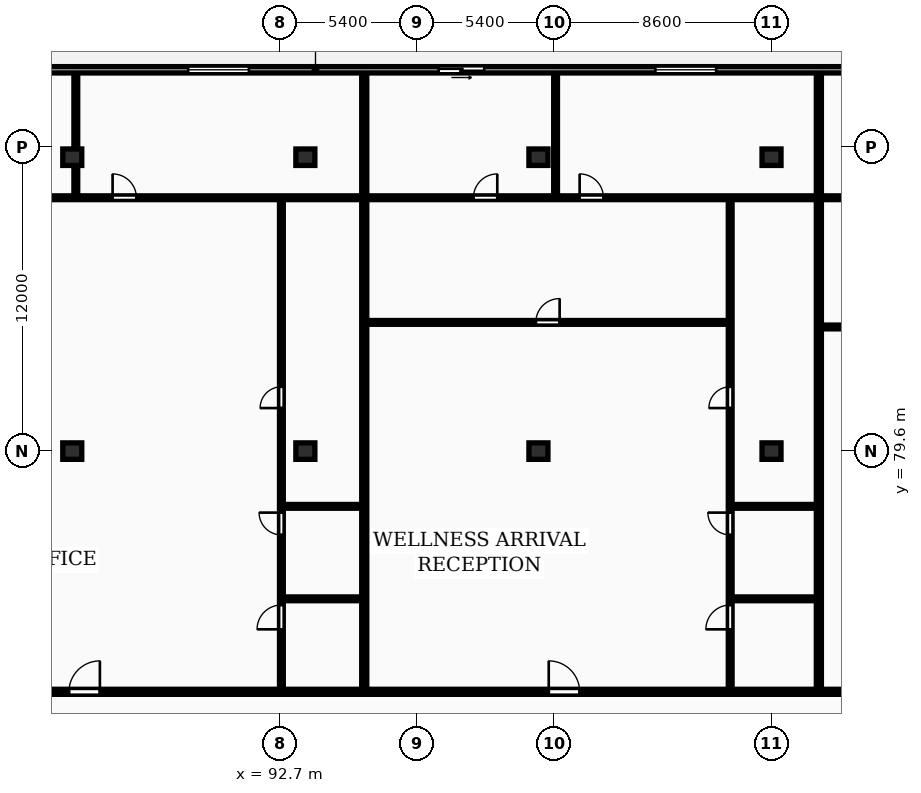
"""IFC4 building model, lengths in metres.
Left out: names, types, materials, properties, quantities, classifications, styles, units other than length and angle.
Written with IfcOpenShell. Run it as: python <this file> out.ifc"""

import sys

from ifc_helpers import new_model, si_unit, direction, frame, frame_2d, origin, origin_2d, place, context, subcontext, project, spatial, rectangle, extrude, element, fill, save


model = new_model("IFC4")
c1 = context("Model", 3, precision=1e-05, world=origin(), true_north=direction((0.0, 1.0)))
c2 = subcontext(c1, "Body", "Model", "MODEL_VIEW")
j1 = project(units=[si_unit("LENGTHUNIT", "METRE"), si_unit("PLANEANGLEUNIT", "RADIAN")], contexts=[c1])
p1 = place(None, origin())
s1 = spatial("IfcSite", under=j1, at=p1, CompositionType="ELEMENT")
p2 = place(p1, origin())
s2 = spatial("IfcBuilding", under=s1, at=p2, CompositionType="ELEMENT")
p3 = place(p2, frame((0.0, 0.0, 242.45)))
s3 = spatial("IfcBuildingStorey", under=s2, at=p3, CompositionType="ELEMENT", Elevation=242.45)
for number, where, z_axis, x_axis in (
    (1, (84.5, 79.6, 0.0), (0.0, 0.0, 1.0), (1.0, 0.0, 0.0)),
    (2, (84.5, 91.2, 0.0), (0.0, 0.0, 1.0), (1.0, 0.0, 0.0)),
    (3, (93.7, 79.6, 0.0), (0.0, 0.0, 1.0), (1.0, 0.0, 0.0)),
    (4, (93.7, 91.2, 0.0), (0.0, 0.0, 1.0), (1.0, 0.0, 0.0)),
    (5, (102.9, 79.6, 0.0), (0.0, 0.0, 1.0), (1.0, 0.0, 0.0)),
    (6, (102.9, 91.2, 0.0), (0.0, 0.0, 1.0), (1.0, 0.0, 0.0)),
    (7, (112.1, 79.6, 0.0), (0.0, 0.0, 1.0), (1.0, 0.0, 0.0)),
    (8, (112.1, 91.2, 0.0), (0.0, 0.0, 1.0), (1.0, 0.0, 0.0)),
):
    element("IfcColumn", number, at=place(p3, frame(where, z_axis=z_axis, x_axis=x_axis)), inside=s3, PredefinedType="COLUMN", context=c2, shape_type="SweptSolid", body=[
        extrude(rectangle(XDim=0.75, YDim=0.65, at=origin_2d()), origin(), (0.0, 0.0, 1.0), 3.45),
    ])
p4 = place(p3, frame((128.4, 94.65, 0.0), z_axis=(0.0, 0.0, 1.0), x_axis=(-1.0, 0.0, 0.0)))
e9 = element("IfcWall", 9, at=p4, inside=s3, PredefinedType="STANDARD", context=c2, shape_type="SweptSolid", body=[
    extrude(rectangle(XDim=68.6, YDim=0.25, at=frame_2d((34.3, 0.0))), origin(), (0.0, 0.0, 1.0), 3.17),
])
p5 = place(p4, frame((59.137, 0.0, 0.85)))
e10 = element("IfcOpeningElement", 10, at=p5, cuts=e9, PredefinedType="OPENING", context=c2, shape_type="SweptSolid", body=[
    extrude(rectangle(XDim=2.4, YDim=1.9, at=frame_2d((1.2, 0.95))), frame((0.0, 0.135, 0.0), z_axis=(0.0, -1.0, 0.0), x_axis=(1.0, 0.0, 0.0)), (0.0, 0.0, 1.0), 0.27),
])
p6 = place(p4, frame((65.245, 0.0, 0.0)))
e11 = element("IfcOpeningElement", 11, at=p6, cuts=e9, PredefinedType="OPENING", context=c2, shape_type="SweptSolid", body=[
    extrude(rectangle(XDim=1.8, YDim=2.2, at=frame_2d((0.9, 1.1))), frame((0.0, 0.135, 0.0), z_axis=(0.0, -1.0, 0.0), x_axis=(1.0, 0.0, 0.0)), (0.0, 0.0, 1.0), 0.27),
])
p7 = place(p4, frame((53.56, 0.0, 0.85)))
e12 = element("IfcOpeningElement", 12, at=p7, cuts=e9, PredefinedType="OPENING", context=c2, shape_type="SweptSolid", body=[
    extrude(rectangle(XDim=2.4, YDim=1.9, at=frame_2d((1.2, 0.95))), frame((0.0, 0.135, 0.0), z_axis=(0.0, -1.0, 0.0), x_axis=(1.0, 0.0, 0.0)), (0.0, 0.0, 1.0), 0.27),
])
p8 = place(p4, frame((47.188, 0.0, 0.0)))
e13 = element("IfcOpeningElement", 13, at=p8, cuts=e9, PredefinedType="OPENING", context=c2, shape_type="SweptSolid", body=[
    extrude(rectangle(XDim=1.8, YDim=2.2, at=frame_2d((0.9, 1.1))), frame((0.0, 0.135, 0.0), z_axis=(0.0, -1.0, 0.0), x_axis=(1.0, 0.0, 0.0)), (0.0, 0.0, 1.0), 0.27),
])
p9 = place(p4, frame((36.928, 0.0, 0.85)))
e14 = element("IfcOpeningElement", 14, at=p9, cuts=e9, PredefinedType="OPENING", context=c2, shape_type="SweptSolid", body=[
    extrude(rectangle(XDim=2.4, YDim=1.9, at=frame_2d((1.2, 0.95))), frame((0.0, 0.135, 0.0), z_axis=(0.0, -1.0, 0.0), x_axis=(1.0, 0.0, 0.0)), (0.0, 0.0, 1.0), 0.27),
])
p10 = place(p4, frame((27.64, 0.0, 0.0)))
e15 = element("IfcOpeningElement", 15, at=p10, cuts=e9, PredefinedType="OPENING", context=c2, shape_type="SweptSolid", body=[
    extrude(rectangle(XDim=1.8, YDim=2.2, at=frame_2d((0.9, 1.1))), frame((0.0, 0.135, 0.0), z_axis=(0.0, -1.0, 0.0), x_axis=(1.0, 0.0, 0.0)), (0.0, 0.0, 1.0), 0.27),
])
p11 = place(p4, frame((18.487, 0.0, 0.85)))
e16 = element("IfcOpeningElement", 16, at=p11, cuts=e9, PredefinedType="OPENING", context=c2, shape_type="SweptSolid", body=[
    extrude(rectangle(XDim=2.4, YDim=1.9, at=frame_2d((1.2, 0.95))), frame((0.0, 0.135, 0.0), z_axis=(0.0, -1.0, 0.0), x_axis=(1.0, 0.0, 0.0)), (0.0, 0.0, 1.0), 0.27),
])
p12 = place(p4, frame((7.966, 0.0, 0.0)))
e17 = element("IfcOpeningElement", 17, at=p12, cuts=e9, PredefinedType="OPENING", context=c2, shape_type="SweptSolid", body=[
    extrude(rectangle(XDim=1.8, YDim=2.2, at=frame_2d((0.9, 1.1))), frame((0.0, 0.135, 0.0), z_axis=(0.0, -1.0, 0.0), x_axis=(1.0, 0.0, 0.0)), (0.0, 0.0, 1.0), 0.27),
])
p13 = place(p4, frame((0.87, 0.0, 0.85)))
e18 = element("IfcOpeningElement", 18, at=p13, cuts=e9, PredefinedType="OPENING", context=c2, shape_type="SweptSolid", body=[
    extrude(rectangle(XDim=1.8, YDim=1.8, at=frame_2d((0.9, 0.9))), frame((0.0, 0.135, 0.0), z_axis=(0.0, -1.0, 0.0), x_axis=(1.0, 0.0, 0.0)), (0.0, 0.0, 1.0), 0.27),
])
p14 = place(p3, frame((96.024, 70.18, 0.0), z_axis=(0.0, 0.0, 1.0), x_axis=(0.0, 1.0, 0.0)))
e19 = element("IfcWall", 19, at=p14, inside=s3, PredefinedType="PARTITIONING", context=c2, shape_type="SweptSolid", body=[
    extrude(rectangle(XDim=24.32, YDim=0.2, at=frame_2d((12.16, 0.0))), origin(), (0.0, 0.0, 1.0), 3.17),
])
for number, where, z_axis, x_axis in (
    (20, (92.814, 73.77, 0.0), (0.0, 0.0, 1.0), (1.0, 0.0, 0.0)),
    (21, (92.814, 77.42, 0.0), (0.0, 0.0, 1.0), (1.0, 0.0, 0.0)),
):
    element("IfcWall", number, at=place(p3, frame(where, z_axis=z_axis, x_axis=x_axis)), inside=s3, PredefinedType="PARTITIONING", context=c2, shape_type="SweptSolid", body=[
        extrude(rectangle(XDim=3.13, YDim=0.15, at=frame_2d((1.565, 0.0))), origin(), (0.0, 0.0, 1.0), 3.17),
    ])
p15 = place(p3, frame((92.754, 70.16, 0.0), z_axis=(0.0, 0.0, 1.0), x_axis=(0.0, 1.0, 0.0)))
e22 = element("IfcWall", 22, at=p15, inside=s3, PredefinedType="PARTITIONING", context=c2, shape_type="SweptSolid", body=[
    extrude(rectangle(XDim=19.38, YDim=0.15, at=frame_2d((9.69, 0.0))), origin(), (0.0, 0.0, 1.0), 3.17),
])
p16 = place(p15, frame((2.406, 0.0, 0.0)))
e23 = element("IfcOpeningElement", 23, at=p16, cuts=e22, PredefinedType="OPENING", context=c2, shape_type="SweptSolid", body=[
    extrude(rectangle(XDim=0.96, YDim=2.1, at=frame_2d((0.48, 1.05))), frame((0.0, 0.085, 0.0), z_axis=(0.0, -1.0, 0.0), x_axis=(1.0, 0.0, 0.0)), (0.0, 0.0, 1.0), 0.17),
])
p17 = place(p15, frame((6.133, 0.0, 0.0)))
e24 = element("IfcOpeningElement", 24, at=p17, cuts=e22, PredefinedType="OPENING", context=c2, shape_type="SweptSolid", body=[
    extrude(rectangle(XDim=0.88, YDim=2.06, at=frame_2d((0.44, 1.03))), frame((0.0, 0.085, 0.0), z_axis=(0.0, -1.0, 0.0), x_axis=(1.0, 0.0, 0.0)), (0.0, 0.0, 1.0), 0.17),
])
p18 = place(p15, frame((11.139, 0.0, 0.0)))
e25 = element("IfcOpeningElement", 25, at=p18, cuts=e22, PredefinedType="OPENING", context=c2, shape_type="SweptSolid", body=[
    extrude(rectangle(XDim=0.84, YDim=2.04, at=frame_2d((0.42, 1.02))), frame((0.0, 0.085, 0.0), z_axis=(0.0, -1.0, 0.0), x_axis=(1.0, 0.0, 0.0)), (0.0, 0.0, 1.0), 0.17),
])
p19 = place(p3, frame((84.64, 89.68, 0.0), z_axis=(0.0, 0.0, 1.0), x_axis=(0.0, 1.0, 0.0)))
e26 = element("IfcWall", 26, at=p19, inside=s3, PredefinedType="PARTITIONING", context=c2, shape_type="SweptSolid", body=[
    extrude(rectangle(XDim=4.82, YDim=0.15, at=frame_2d((2.41, 0.0))), origin(), (0.0, 0.0, 1.0), 2.477),
])
p20 = place(p3, frame((75.945, 89.6, 0.0), z_axis=(0.0, 0.0, 1.0), x_axis=(1.0, 0.0, 0.0)))
e27 = element("IfcWall", 27, at=p20, inside=s3, PredefinedType="PARTITIONING", context=c2, shape_type="SweptSolid", body=[
    extrude(rectangle(XDim=19.999, YDim=0.15, at=frame_2d((10.0, 0.0))), origin(), (0.0, 0.0, 1.0), 3.17),
])
p21 = place(p20, frame((6.054, 0.0, 0.0)))
e28 = element("IfcOpeningElement", 28, at=p21, cuts=e27, PredefinedType="OPENING", context=c2, shape_type="SweptSolid", body=[
    extrude(rectangle(XDim=0.94, YDim=2.1, at=frame_2d((0.47, 1.05))), frame((0.0, 0.085, 0.0), z_axis=(0.0, -1.0, 0.0), x_axis=(1.0, 0.0, 0.0)), (0.0, 0.0, 1.0), 0.17),
])
p22 = place(p20, frame((10.146, 0.0, 0.0)))
e29 = element("IfcOpeningElement", 29, at=p22, cuts=e27, PredefinedType="OPENING", context=c2, shape_type="SweptSolid", body=[
    extrude(rectangle(XDim=0.94, YDim=2.1, at=frame_2d((0.47, 1.05))), frame((0.0, 0.085, 0.0), z_axis=(0.0, -1.0, 0.0), x_axis=(1.0, 0.0, 0.0)), (0.0, 0.0, 1.0), 0.17),
])
p23 = place(p3, frame((113.969, 70.18, 0.0), z_axis=(0.0, 0.0, 1.0), x_axis=(0.0, 1.0, 0.0)))
e30 = element("IfcWall", 30, at=p23, inside=s3, PredefinedType="PARTITIONING", context=c2, shape_type="SweptSolid", body=[
    extrude(rectangle(XDim=24.32, YDim=0.2, at=frame_2d((12.16, 0.0))), origin(), (0.0, 0.0, 1.0), 3.17),
])
p24 = place(p3, frame((96.104, 84.68, 0.0), z_axis=(0.0, 0.0, 1.0), x_axis=(1.0, 0.0, 0.0)))
e31 = element("IfcWall", 31, at=p24, inside=s3, PredefinedType="PARTITIONING", context=c2, shape_type="SweptSolid", body=[
    extrude(rectangle(XDim=14.324, YDim=0.15, at=frame_2d((7.162, 0.0))), origin(), (0.0, 0.0, 1.0), 3.17),
])
p25 = place(p24, frame((6.692, 0.0, 0.0)))
e32 = element("IfcOpeningElement", 32, at=p25, cuts=e31, PredefinedType="OPENING", context=c2, shape_type="SweptSolid", body=[
    extrude(rectangle(XDim=0.94, YDim=2.1, at=frame_2d((0.47, 1.05))), frame((0.0, 0.085, 0.0), z_axis=(0.0, -1.0, 0.0), x_axis=(1.0, 0.0, 0.0)), (0.0, 0.0, 1.0), 0.17),
])
for number, where, z_axis, x_axis in (
    (33, (110.529, 73.77, 0.0), (0.0, 0.0, 1.0), (1.0, 0.0, 0.0)),
    (34, (110.529, 77.42, 0.0), (0.0, 0.0, 1.0), (1.0, 0.0, 0.0)),
):
    element("IfcWall", number, at=place(p3, frame(where, z_axis=z_axis, x_axis=x_axis)), inside=s3, PredefinedType="PARTITIONING", context=c2, shape_type="SweptSolid", body=[
        extrude(rectangle(XDim=3.36, YDim=0.15, at=frame_2d((1.68, 0.0))), origin(), (0.0, 0.0, 1.0), 3.17),
    ])
p26 = place(p3, frame((110.469, 70.16, 0.0), z_axis=(0.0, 0.0, 1.0), x_axis=(0.0, 1.0, 0.0)))
e35 = element("IfcWall", 35, at=p26, inside=s3, PredefinedType="PARTITIONING", context=c2, shape_type="SweptSolid", body=[
    extrude(rectangle(XDim=19.38, YDim=0.15, at=frame_2d((9.69, 0.0))), origin(), (0.0, 0.0, 1.0), 3.17),
])
p27 = place(p26, frame((2.406, 0.0, 0.0)))
e36 = element("IfcOpeningElement", 36, at=p27, cuts=e35, PredefinedType="OPENING", context=c2, shape_type="SweptSolid", body=[
    extrude(rectangle(XDim=0.96, YDim=2.1, at=frame_2d((0.48, 1.05))), frame((0.0, 0.085, 0.0), z_axis=(0.0, -1.0, 0.0), x_axis=(1.0, 0.0, 0.0)), (0.0, 0.0, 1.0), 0.17),
])
p28 = place(p26, frame((6.133, 0.0, 0.0)))
e37 = element("IfcOpeningElement", 37, at=p28, cuts=e35, PredefinedType="OPENING", context=c2, shape_type="SweptSolid", body=[
    extrude(rectangle(XDim=0.88, YDim=2.06, at=frame_2d((0.44, 1.03))), frame((0.0, 0.085, 0.0), z_axis=(0.0, -1.0, 0.0), x_axis=(1.0, 0.0, 0.0)), (0.0, 0.0, 1.0), 0.17),
])
p29 = place(p26, frame((11.139, 0.0, 0.0)))
e38 = element("IfcOpeningElement", 38, at=p29, cuts=e35, PredefinedType="OPENING", context=c2, shape_type="SweptSolid", body=[
    extrude(rectangle(XDim=0.84, YDim=2.04, at=frame_2d((0.42, 1.02))), frame((0.0, 0.085, 0.0), z_axis=(0.0, -1.0, 0.0), x_axis=(1.0, 0.0, 0.0)), (0.0, 0.0, 1.0), 0.17),
])
p30 = place(p3, frame((103.576, 89.68, 0.0), z_axis=(0.0, 0.0, 1.0), x_axis=(0.0, 1.0, 0.0)))
e39 = element("IfcWall", 39, at=p30, inside=s3, PredefinedType="PARTITIONING", context=c2, shape_type="SweptSolid", body=[
    extrude(rectangle(XDim=4.82, YDim=0.15, at=frame_2d((2.41, 0.0))), origin(), (0.0, 0.0, 1.0), 3.17),
])
p31 = place(p3, frame((96.104, 89.6, 0.0), z_axis=(0.0, 0.0, 1.0), x_axis=(1.0, 0.0, 0.0)))
e40 = element("IfcWall", 40, at=p31, inside=s3, PredefinedType="PARTITIONING", context=c2, shape_type="SweptSolid", body=[
    extrude(rectangle(XDim=17.785, YDim=0.15, at=frame_2d((8.892, 0.0))), origin(), (0.0, 0.0, 1.0), 3.17),
])
p32 = place(p31, frame((4.231, 0.0, 0.0)))
e41 = element("IfcOpeningElement", 41, at=p32, cuts=e40, PredefinedType="OPENING", context=c2, shape_type="SweptSolid", body=[
    extrude(rectangle(XDim=0.94, YDim=2.1, at=frame_2d((0.47, 1.05))), frame((0.0, 0.085, 0.0), z_axis=(0.0, -1.0, 0.0), x_axis=(1.0, 0.0, 0.0)), (0.0, 0.0, 1.0), 0.17),
])
p33 = place(p31, frame((8.422, 0.0, 0.0)))
e42 = element("IfcOpeningElement", 42, at=p33, cuts=e40, PredefinedType="OPENING", context=c2, shape_type="SweptSolid", body=[
    extrude(rectangle(XDim=0.94, YDim=2.1, at=frame_2d((0.47, 1.05))), frame((0.0, 0.085, 0.0), z_axis=(0.0, -1.0, 0.0), x_axis=(1.0, 0.0, 0.0)), (0.0, 0.0, 1.0), 0.17),
])
p34 = place(p3, frame((114.049, 84.5, 0.0), z_axis=(0.0, 0.0, 1.0), x_axis=(1.0, 0.0, 0.0)))
e43 = element("IfcWall", 43, at=p34, inside=s3, PredefinedType="PARTITIONING", context=c2, shape_type="SweptSolid", body=[
    extrude(rectangle(XDim=14.271, YDim=0.15, at=frame_2d((7.136, 0.0))), origin(), (0.0, 0.0, 1.0), 3.17),
])
p35 = place(p34, frame((2.72, 0.0, 0.0)))
e44 = element("IfcOpeningElement", 44, at=p35, cuts=e43, PredefinedType="OPENING", context=c2, shape_type="SweptSolid", body=[
    extrude(rectangle(XDim=0.92, YDim=2.08, at=frame_2d((0.46, 1.04))), frame((0.0, 0.085, 0.0), z_axis=(0.0, -1.0, 0.0), x_axis=(1.0, 0.0, 0.0)), (0.0, 0.0, 1.0), 0.17),
])
p36 = place(p3, frame((114.049, 89.6, 0.0), z_axis=(0.0, 0.0, 1.0), x_axis=(1.0, 0.0, 0.0)))
e45 = element("IfcWall", 45, at=p36, inside=s3, PredefinedType="PARTITIONING", context=c2, shape_type="SweptSolid", body=[
    extrude(rectangle(XDim=14.271, YDim=0.15, at=frame_2d((7.136, 0.0))), origin(), (0.0, 0.0, 1.0), 3.17),
])
p37 = place(p36, frame((7.843, 0.0, 0.0)))
e46 = element("IfcOpeningElement", 46, at=p37, cuts=e45, PredefinedType="OPENING", context=c2, shape_type="SweptSolid", body=[
    extrude(rectangle(XDim=0.94, YDim=2.1, at=frame_2d((0.47, 1.05))), frame((0.0, 0.085, 0.0), z_axis=(0.0, -1.0, 0.0), x_axis=(1.0, 0.0, 0.0)), (0.0, 0.0, 1.0), 0.17),
])
p38 = place(p3, frame((59.8, 70.1, 0.0), z_axis=(0.0, 0.0, 1.0), x_axis=(1.0, 0.0, 0.0)))
e47 = element("IfcWall", 47, at=p38, inside=s3, PredefinedType="PARTITIONING", context=c2, shape_type="SweptSolid", body=[
    extrude(rectangle(XDim=68.6, YDim=0.2, at=frame_2d((34.3, 0.0))), origin(), (0.0, 0.0, 1.0), 3.17),
])
p39 = place(p38, frame((2.045, 0.0, 0.0)))
e48 = element("IfcOpeningElement", 48, at=p39, cuts=e47, PredefinedType="OPENING", context=c2, shape_type="SweptSolid", body=[
    extrude(rectangle(XDim=0.95, YDim=2.15, at=frame_2d((0.475, 1.075))), frame((0.0, 0.11, 0.0), z_axis=(0.0, -1.0, 0.0), x_axis=(1.0, 0.0, 0.0)), (0.0, 0.0, 1.0), 0.22),
])
p40 = place(p38, frame((24.57, 0.0, 0.0)))
e49 = element("IfcOpeningElement", 49, at=p40, cuts=e47, PredefinedType="OPENING", context=c2, shape_type="SweptSolid", body=[
    extrude(rectangle(XDim=1.22, YDim=2.18, at=frame_2d((0.61, 1.09))), frame((0.0, 0.11, 0.0), z_axis=(0.0, -1.0, 0.0), x_axis=(1.0, 0.0, 0.0)), (0.0, 0.0, 1.0), 0.22),
])
p41 = place(p38, frame((43.507, 0.0, 0.0)))
e50 = element("IfcOpeningElement", 50, at=p41, cuts=e47, PredefinedType="OPENING", context=c2, shape_type="SweptSolid", body=[
    extrude(rectangle(XDim=1.22, YDim=2.18, at=frame_2d((0.61, 1.09))), frame((0.0, 0.11, 0.0), z_axis=(0.0, -1.0, 0.0), x_axis=(1.0, 0.0, 0.0)), (0.0, 0.0, 1.0), 0.22),
])
p42 = place(p38, frame((56.214, 0.0, 0.0)))
e51 = element("IfcOpeningElement", 51, at=p42, cuts=e47, PredefinedType="OPENING", context=c2, shape_type="SweptSolid", body=[
    extrude(rectangle(XDim=0.95, YDim=2.15, at=frame_2d((0.475, 1.075))), frame((0.0, 0.11, 0.0), z_axis=(0.0, -1.0, 0.0), x_axis=(1.0, 0.0, 0.0)), (0.0, 0.0, 1.0), 0.22),
])
p43 = place(p9, origin())
e52 = element("IfcWindow", 52, at=p43, inside=s3, PartitioningType="DOUBLE_PANEL_VERTICAL", PredefinedType="WINDOW", context=c2, shape_type="SweptSolid", body=[
    extrude(rectangle(XDim=2.4, YDim=1.9, at=frame_2d((1.2, 0.95))), frame((0.0, 0.03, 0.0), z_axis=(0.0, -1.0, 0.0), x_axis=(1.0, 0.0, 0.0)), (0.0, 0.0, 1.0), 0.06),
])
fill(e14, e52)
p44 = place(p10, origin())
e53 = element("IfcDoor", 53, at=p44, inside=s3, OperationType="SLIDING_TO_LEFT", PredefinedType="DOOR", context=c2, shape_type="SweptSolid", body=[
    extrude(rectangle(XDim=1.8, YDim=2.2, at=frame_2d((0.9, 1.1))), frame((0.0, 0.025, 0.0), z_axis=(0.0, -1.0, 0.0), x_axis=(1.0, 0.0, 0.0)), (0.0, 0.0, 1.0), 0.05),
])
fill(e15, e53)
p45 = place(p11, origin())
e54 = element("IfcWindow", 54, at=p45, inside=s3, PartitioningType="DOUBLE_PANEL_VERTICAL", PredefinedType="WINDOW", context=c2, shape_type="SweptSolid", body=[
    extrude(rectangle(XDim=2.4, YDim=1.9, at=frame_2d((1.2, 0.95))), frame((0.0, 0.03, 0.0), z_axis=(0.0, -1.0, 0.0), x_axis=(1.0, 0.0, 0.0)), (0.0, 0.0, 1.0), 0.06),
])
fill(e16, e54)
p46 = place(p16, origin())
e55 = element("IfcDoor", 55, at=p46, inside=s3, OperationType="SINGLE_SWING_LEFT", PredefinedType="DOOR", context=c2, shape_type="SweptSolid", body=[
    extrude(rectangle(XDim=0.96, YDim=2.1, at=frame_2d((0.48, 1.05))), frame((0.0, 0.025, 0.0), z_axis=(0.0, -1.0, 0.0), x_axis=(1.0, 0.0, 0.0)), (0.0, 0.0, 1.0), 0.05),
])
fill(e23, e55)
p47 = place(p17, origin())
e56 = element("IfcDoor", 56, at=p47, inside=s3, OperationType="SINGLE_SWING_RIGHT", PredefinedType="DOOR", context=c2, shape_type="SweptSolid", body=[
    extrude(rectangle(XDim=0.88, YDim=2.06, at=frame_2d((0.44, 1.03))), frame((0.0, 0.025, 0.0), z_axis=(0.0, -1.0, 0.0), x_axis=(1.0, 0.0, 0.0)), (0.0, 0.0, 1.0), 0.05),
])
fill(e24, e56)
p48 = place(p18, origin())
e57 = element("IfcDoor", 57, at=p48, inside=s3, OperationType="SINGLE_SWING_LEFT", PredefinedType="DOOR", context=c2, shape_type="SweptSolid", body=[
    extrude(rectangle(XDim=0.84, YDim=2.04, at=frame_2d((0.42, 1.02))), frame((0.0, 0.025, 0.0), z_axis=(0.0, -1.0, 0.0), x_axis=(1.0, 0.0, 0.0)), (0.0, 0.0, 1.0), 0.05),
])
fill(e25, e57)
p49 = place(p22, origin())
e58 = element("IfcDoor", 58, at=p49, inside=s3, OperationType="SINGLE_SWING_LEFT", PredefinedType="DOOR", context=c2, shape_type="SweptSolid", body=[
    extrude(rectangle(XDim=0.94, YDim=2.1, at=frame_2d((0.47, 1.05))), frame((0.0, 0.025, 0.0), z_axis=(0.0, -1.0, 0.0), x_axis=(1.0, 0.0, 0.0)), (0.0, 0.0, 1.0), 0.05),
])
fill(e29, e58)
p50 = place(p25, origin())
e59 = element("IfcDoor", 59, at=p50, inside=s3, OperationType="SINGLE_SWING_RIGHT", PredefinedType="DOOR", context=c2, shape_type="SweptSolid", body=[
    extrude(rectangle(XDim=0.94, YDim=2.1, at=frame_2d((0.47, 1.05))), frame((0.0, 0.025, 0.0), z_axis=(0.0, -1.0, 0.0), x_axis=(1.0, 0.0, 0.0)), (0.0, 0.0, 1.0), 0.05),
])
fill(e32, e59)
p51 = place(p27, origin())
e60 = element("IfcDoor", 60, at=p51, inside=s3, OperationType="SINGLE_SWING_LEFT", PredefinedType="DOOR", context=c2, shape_type="SweptSolid", body=[
    extrude(rectangle(XDim=0.96, YDim=2.1, at=frame_2d((0.48, 1.05))), frame((0.0, 0.025, 0.0), z_axis=(0.0, -1.0, 0.0), x_axis=(1.0, 0.0, 0.0)), (0.0, 0.0, 1.0), 0.05),
])
fill(e36, e60)
p52 = place(p28, origin())
e61 = element("IfcDoor", 61, at=p52, inside=s3, OperationType="SINGLE_SWING_RIGHT", PredefinedType="DOOR", context=c2, shape_type="SweptSolid", body=[
    extrude(rectangle(XDim=0.88, YDim=2.06, at=frame_2d((0.44, 1.03))), frame((0.0, 0.025, 0.0), z_axis=(0.0, -1.0, 0.0), x_axis=(1.0, 0.0, 0.0)), (0.0, 0.0, 1.0), 0.05),
])
fill(e37, e61)
p53 = place(p29, origin())
e62 = element("IfcDoor", 62, at=p53, inside=s3, OperationType="SINGLE_SWING_LEFT", PredefinedType="DOOR", context=c2, shape_type="SweptSolid", body=[
    extrude(rectangle(XDim=0.84, YDim=2.04, at=frame_2d((0.42, 1.02))), frame((0.0, 0.025, 0.0), z_axis=(0.0, -1.0, 0.0), x_axis=(1.0, 0.0, 0.0)), (0.0, 0.0, 1.0), 0.05),
])
fill(e38, e62)
p54 = place(p32, origin())
e63 = element("IfcDoor", 63, at=p54, inside=s3, OperationType="SINGLE_SWING_RIGHT", PredefinedType="DOOR", context=c2, shape_type="SweptSolid", body=[
    extrude(rectangle(XDim=0.94, YDim=2.1, at=frame_2d((0.47, 1.05))), frame((0.0, 0.025, 0.0), z_axis=(0.0, -1.0, 0.0), x_axis=(1.0, 0.0, 0.0)), (0.0, 0.0, 1.0), 0.05),
])
fill(e41, e63)
p55 = place(p33, origin())
e64 = element("IfcDoor", 64, at=p55, inside=s3, OperationType="SINGLE_SWING_LEFT", PredefinedType="DOOR", context=c2, shape_type="SweptSolid", body=[
    extrude(rectangle(XDim=0.94, YDim=2.1, at=frame_2d((0.47, 1.05))), frame((0.0, 0.025, 0.0), z_axis=(0.0, -1.0, 0.0), x_axis=(1.0, 0.0, 0.0)), (0.0, 0.0, 1.0), 0.05),
])
fill(e42, e64)
p56 = place(p40, origin())
e65 = element("IfcDoor", 65, at=p56, inside=s3, OperationType="SINGLE_SWING_RIGHT", PredefinedType="DOOR", context=c2, shape_type="SweptSolid", body=[
    extrude(rectangle(XDim=1.22, YDim=2.18, at=frame_2d((0.61, 1.09))), frame((0.0, 0.025, 0.0), z_axis=(0.0, -1.0, 0.0), x_axis=(1.0, 0.0, 0.0)), (0.0, 0.0, 1.0), 0.05),
])
fill(e49, e65)
p57 = place(p41, origin())
e66 = element("IfcDoor", 66, at=p57, inside=s3, OperationType="SINGLE_SWING_LEFT", PredefinedType="DOOR", context=c2, shape_type="SweptSolid", body=[
    extrude(rectangle(XDim=1.22, YDim=2.18, at=frame_2d((0.61, 1.09))), frame((0.0, 0.025, 0.0), z_axis=(0.0, -1.0, 0.0), x_axis=(1.0, 0.0, 0.0)), (0.0, 0.0, 1.0), 0.05),
])
fill(e50, e66)
save(model, sys.argv[1])
